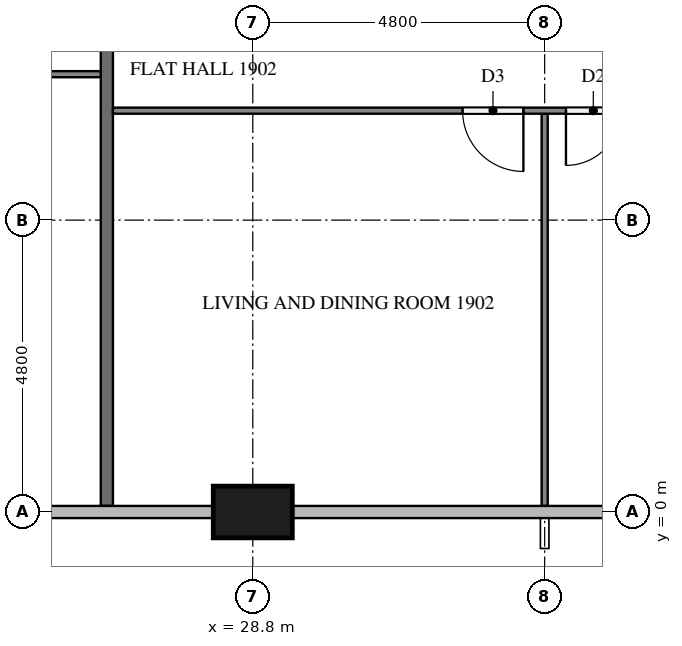
"""IFC4 building model, lengths in metres.
Left out: names, types, materials, properties, quantities, classifications, styles, units other than length and angle.
Written with IfcOpenShell. Run it as: python <this file> out.ifc"""

import sys

from ifc_helpers import new_model, si_unit, direction, frame, frame_2d, origin, origin_2d, place, context, subcontext, project, spatial, rectangle, extrude, element, fill, save


model = new_model("IFC4")
c1 = context("Model", 3, precision=1e-05, world=origin(), true_north=direction((0.0, 1.0)))
c2 = subcontext(c1, "Body", "Model", "MODEL_VIEW")
j1 = project(units=[si_unit("LENGTHUNIT", "METRE"), si_unit("PLANEANGLEUNIT", "RADIAN")], contexts=[c1])
p1 = place(None, origin())
s1 = spatial("IfcSite", under=j1, at=p1, CompositionType="ELEMENT")
p2 = place(p1, origin())
s2 = spatial("IfcBuilding", under=s1, at=p2, CompositionType="ELEMENT")
p3 = place(p2, frame((0.0, 0.0, 76.8)))
s3 = spatial("IfcBuildingStorey", under=s2, at=p3, CompositionType="ELEMENT", Elevation=76.8)
p4 = place(p3, frame((28.8, 0.0, 0.0), z_axis=(0.0, 0.0, 1.0), x_axis=(1.0, 0.0, 0.0)))
e1 = element("IfcColumn", 1, at=p4, inside=s3, PredefinedType="COLUMN", context=c2, shape_type="SweptSolid", body=[
    extrude(rectangle(XDim=1.3, YDim=0.85, at=origin_2d()), origin(), (0.0, 0.0, 1.0), 3.2),
])
p5 = place(p3, frame((26.4, 11.9, 0.0), z_axis=(0.0, 0.0, 1.0), x_axis=(0.0, -1.0, 0.0)))
e2 = element("IfcWall", 2, at=p5, inside=s3, PredefinedType="PARTITIONING", context=c2, shape_type="SweptSolid", body=[
    extrude(rectangle(XDim=11.8, YDim=0.2, at=frame_2d((5.9, 0.0))), origin(), (0.0, 0.0, 1.0), 3.2),
])
p6 = place(p3, frame((26.3, 7.2, 0.0), z_axis=(0.0, 0.0, 1.0), x_axis=(-1.0, 0.0, 0.0)))
e3 = element("IfcWall", 3, at=p6, inside=s3, PredefinedType="PARTITIONING", context=c2, shape_type="SweptSolid", body=[
    extrude(rectangle(XDim=14.2, YDim=0.1, at=frame_2d((7.1, 0.0))), origin(), (0.0, 0.0, 1.0), 3.2),
])
p7 = place(p6, frame((12.9, 0.0, 0.0)))
e4 = element("IfcOpeningElement", 4, at=p7, cuts=e3, PredefinedType="OPENING", context=c2, shape_type="SweptSolid", body=[
    extrude(rectangle(XDim=1.0, YDim=2.1, at=frame_2d((0.5, 1.05))), frame((0.0, 0.06, 0.0), z_axis=(0.0, -1.0, 0.0), x_axis=(1.0, 0.0, 0.0)), (0.0, 0.0, 1.0), 0.12),
])
p8 = place(p6, frame((5.05, 0.0, 0.0)))
e5 = element("IfcOpeningElement", 5, at=p8, cuts=e3, PredefinedType="OPENING", context=c2, shape_type="SweptSolid", body=[
    extrude(rectangle(XDim=0.9, YDim=2.1, at=frame_2d((0.45, 1.05))), frame((0.0, 0.06, 0.0), z_axis=(0.0, -1.0, 0.0), x_axis=(1.0, 0.0, 0.0)), (0.0, 0.0, 1.0), 0.12),
])
p9 = place(p6, frame((3.45, 0.0, 0.0)))
e6 = element("IfcOpeningElement", 6, at=p9, cuts=e3, PredefinedType="OPENING", context=c2, shape_type="SweptSolid", body=[
    extrude(rectangle(XDim=0.9, YDim=2.1, at=frame_2d((0.45, 1.05))), frame((0.0, 0.06, 0.0), z_axis=(0.0, -1.0, 0.0), x_axis=(1.0, 0.0, 0.0)), (0.0, 0.0, 1.0), 0.12),
])
p10 = place(p3, frame((33.6, 6.55, 0.0), z_axis=(0.0, 0.0, 1.0), x_axis=(0.0, -1.0, 0.0)))
e7 = element("IfcWall", 7, at=p10, inside=s3, PredefinedType="PARTITIONING", context=c2, shape_type="SweptSolid", body=[
    extrude(rectangle(XDim=6.45, YDim=0.1, at=frame_2d((3.225, 0.0))), origin(), (0.0, 0.0, 1.0), 3.2),
])
p11 = place(p3, frame((38.3, 6.6, 0.0), z_axis=(0.0, 0.0, 1.0), x_axis=(-1.0, 0.0, 0.0)))
e8 = element("IfcWall", 8, at=p11, inside=s3, PredefinedType="PARTITIONING", context=c2, shape_type="SweptSolid", body=[
    extrude(rectangle(XDim=11.8, YDim=0.1, at=frame_2d((5.9, 0.0))), origin(), (0.0, 0.0, 1.0), 3.2),
])
p12 = place(p11, frame((5.05, 0.0, 0.0)))
e9 = element("IfcOpeningElement", 9, at=p12, cuts=e8, PredefinedType="OPENING", context=c2, shape_type="SweptSolid", body=[
    extrude(rectangle(XDim=1.0, YDim=2.1, at=frame_2d((0.5, 1.05))), frame((0.0, 0.06, 0.0), z_axis=(0.0, -1.0, 0.0), x_axis=(1.0, 0.0, 0.0)), (0.0, 0.0, 1.0), 0.12),
])
p13 = place(p11, frame((3.45, 0.0, 0.0)))
e10 = element("IfcOpeningElement", 10, at=p13, cuts=e8, PredefinedType="OPENING", context=c2, shape_type="SweptSolid", body=[
    extrude(rectangle(XDim=0.9, YDim=2.1, at=frame_2d((0.45, 1.05))), frame((0.0, 0.06, 0.0), z_axis=(0.0, -1.0, 0.0), x_axis=(1.0, 0.0, 0.0)), (0.0, 0.0, 1.0), 0.12),
])
p14 = place(p12, origin())
e11 = element("IfcDoor", 11, at=p14, inside=s3, OperationType="SINGLE_SWING_LEFT", PredefinedType="DOOR", context=c2, shape_type="SweptSolid", body=[
    extrude(rectangle(XDim=1.0, YDim=2.1, at=frame_2d((0.5, 1.05))), frame((0.0, 0.025, 0.0), z_axis=(0.0, -1.0, 0.0), x_axis=(1.0, 0.0, 0.0)), (0.0, 0.0, 1.0), 0.05),
])
fill(e9, e11)
p15 = place(p13, origin())
e12 = element("IfcDoor", 12, at=p15, inside=s3, OperationType="SINGLE_SWING_RIGHT", PredefinedType="DOOR", context=c2, shape_type="SweptSolid", body=[
    extrude(rectangle(XDim=0.9, YDim=2.1, at=frame_2d((0.45, 1.05))), frame((0.0, 0.025, 0.0), z_axis=(0.0, -1.0, 0.0), x_axis=(1.0, 0.0, 0.0)), (0.0, 0.0, 1.0), 0.05),
])
fill(e10, e12)
save(model, sys.argv[1])
